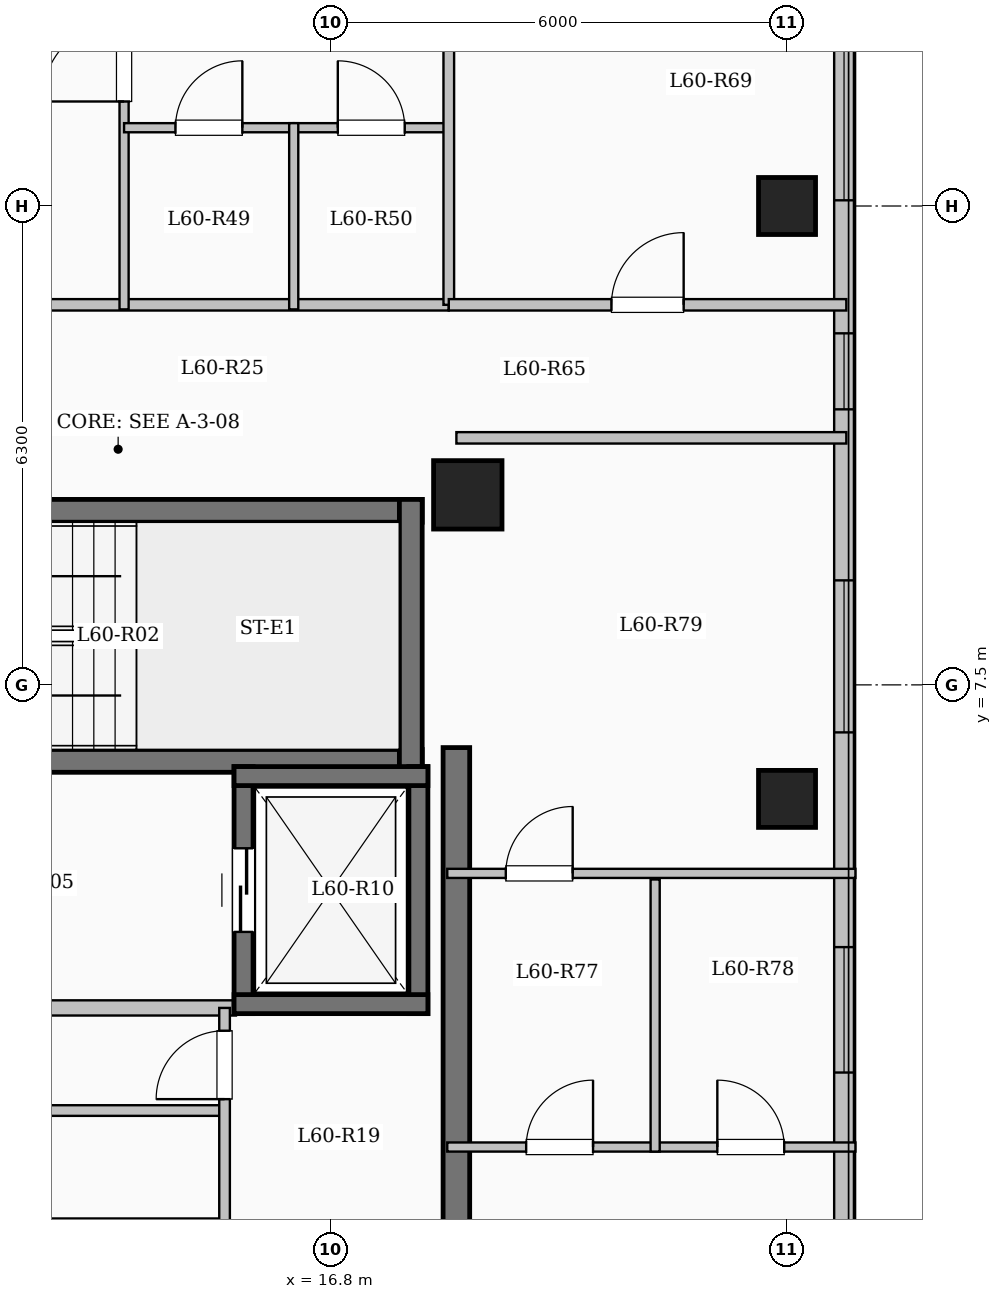
"""IFC4 building model, lengths in metres.
Left out: names, types, materials, properties, quantities, classifications, styles, units other than length and angle.
Written with IfcOpenShell. Run it as: python <this file> out.ifc"""

import sys

from ifc_helpers import new_model, si_unit, direction, frame, frame_2d, origin, origin_2d, place, context, subcontext, project, spatial, rectangle, extrude, element, fill, save


model = new_model("IFC4")
c1 = context("Model", 3, precision=1e-05, world=origin(), true_north=direction((0.0, 1.0)))
c2 = subcontext(c1, "Body", "Model", "MODEL_VIEW")
j1 = project(units=[si_unit("LENGTHUNIT", "METRE"), si_unit("PLANEANGLEUNIT", "RADIAN")], contexts=[c1])
p1 = place(None, origin())
s1 = spatial("IfcSite", under=j1, at=p1, CompositionType="ELEMENT")
p2 = place(p1, origin())
s2 = spatial("IfcBuilding", under=s1, at=p2, CompositionType="ELEMENT")
p3 = place(p2, frame((0.0, 0.0, 220.4)))
s3 = spatial("IfcBuildingStorey", under=s2, at=p3, CompositionType="ELEMENT", Elevation=220.4)
p4 = place(p3, frame((18.6, 10.0, 0.0), z_axis=(0.0, 0.0, 1.0), x_axis=(1.0, 0.0, 0.0)))
e1 = element("IfcColumn", 1, at=p4, inside=s3, PredefinedType="COLUMN", context=c2, shape_type="SweptSolid", body=[
    extrude(rectangle(XDim=0.9, YDim=0.9, at=origin_2d()), origin(), (0.0, 0.0, 1.0), 3.35),
])
for number, where, z_axis, x_axis in (
    (2, (22.8, 6.0, 0.0), (0.0, 0.0, 1.0), (1.0, 0.0, 0.0)),
    (3, (22.8, 13.8, 0.0), (0.0, 0.0, 1.0), (1.0, 0.0, 0.0)),
):
    element("IfcColumn", number, at=place(p3, frame(where, z_axis=z_axis, x_axis=x_axis)), inside=s3, PredefinedType="COLUMN", context=c2, shape_type="SweptSolid", body=[
        extrude(rectangle(XDim=0.75, YDim=0.75, at=origin_2d()), origin(), (0.0, 0.0, 1.0), 3.35),
    ])
p5 = place(p3, frame((23.55, 17.25, 0.0), z_axis=(0.0, 0.0, 1.0), x_axis=(0.0, -1.0, 0.0)))
e4 = element("IfcWall", 4, at=p5, inside=s3, PredefinedType="SOLIDWALL", context=c2, shape_type="SweptSolid", body=[
    extrude(rectangle(XDim=34.5, YDim=0.26, at=frame_2d((17.25, 0.0))), origin(), (0.0, 0.0, 1.0), 3.1),
])
p6 = place(p5, frame((1.375, 0.0, 0.9)))
e5 = element("IfcOpeningElement", 5, at=p6, cuts=e4, PredefinedType="OPENING", context=c2, shape_type="SweptSolid", body=[
    extrude(rectangle(XDim=2.0, YDim=1.7, at=frame_2d((1.0, 0.85))), frame((0.0, 0.14, 0.0), z_axis=(0.0, -1.0, 0.0), x_axis=(1.0, 0.0, 0.0)), (0.0, 0.0, 1.0), 0.28),
])
p7 = place(p5, frame((5.125, 0.0, 0.95)))
e6 = element("IfcOpeningElement", 6, at=p7, cuts=e4, PredefinedType="OPENING", context=c2, shape_type="SweptSolid", body=[
    extrude(rectangle(XDim=1.0, YDim=1.5, at=frame_2d((0.5, 0.75))), frame((0.0, 0.14, 0.0), z_axis=(0.0, -1.0, 0.0), x_axis=(1.0, 0.0, 0.0)), (0.0, 0.0, 1.0), 0.28),
])
p8 = place(p5, frame((8.375, 0.0, 0.9)))
e7 = element("IfcOpeningElement", 7, at=p8, cuts=e4, PredefinedType="OPENING", context=c2, shape_type="SweptSolid", body=[
    extrude(rectangle(XDim=2.0, YDim=1.7, at=frame_2d((1.0, 0.85))), frame((0.0, 0.14, 0.0), z_axis=(0.0, -1.0, 0.0), x_axis=(1.0, 0.0, 0.0)), (0.0, 0.0, 1.0), 0.28),
])
p9 = place(p5, frame((13.2, 0.0, 0.9)))
e8 = element("IfcOpeningElement", 8, at=p9, cuts=e4, PredefinedType="OPENING", context=c2, shape_type="SweptSolid", body=[
    extrude(rectangle(XDim=1.65, YDim=1.6, at=frame_2d((0.825, 0.8))), frame((0.0, 0.14, 0.0), z_axis=(0.0, -1.0, 0.0), x_axis=(1.0, 0.0, 0.0)), (0.0, 0.0, 1.0), 0.28),
])
p10 = place(p5, frame((19.05, 0.0, 0.9)))
e9 = element("IfcOpeningElement", 9, at=p10, cuts=e4, PredefinedType="OPENING", context=c2, shape_type="SweptSolid", body=[
    extrude(rectangle(XDim=2.2, YDim=1.75, at=frame_2d((1.1, 0.875))), frame((0.0, 0.14, 0.0), z_axis=(0.0, -1.0, 0.0), x_axis=(1.0, 0.0, 0.0)), (0.0, 0.0, 1.0), 0.28),
])
p11 = place(p5, frame((24.975, 0.0, 0.95)))
e10 = element("IfcOpeningElement", 10, at=p11, cuts=e4, PredefinedType="OPENING", context=c2, shape_type="SweptSolid", body=[
    extrude(rectangle(XDim=1.2, YDim=1.5, at=frame_2d((0.6, 0.75))), frame((0.0, 0.14, 0.0), z_axis=(0.0, -1.0, 0.0), x_axis=(1.0, 0.0, 0.0)), (0.0, 0.0, 1.0), 0.28),
])
p12 = place(p5, frame((29.475, 0.0, 0.9)))
e11 = element("IfcOpeningElement", 11, at=p12, cuts=e4, PredefinedType="OPENING", context=c2, shape_type="SweptSolid", body=[
    extrude(rectangle(XDim=2.2, YDim=1.75, at=frame_2d((1.1, 0.875))), frame((0.0, 0.14, 0.0), z_axis=(0.0, -1.0, 0.0), x_axis=(1.0, 0.0, 0.0)), (0.0, 0.0, 1.0), 0.28),
])
p13 = place(p3, frame((10.0, 9.79, 0.0), z_axis=(0.0, 0.0, 1.0), x_axis=(1.0, 0.0, 0.0)))
e12 = element("IfcWall", 12, at=p13, inside=s3, PredefinedType="SHEAR", context=c2, shape_type="SweptSolid", body=[
    extrude(rectangle(XDim=8.0, YDim=0.3, at=frame_2d((4.0, 0.0))), origin(), (0.0, 0.0, 1.0), 3.35),
])
p14 = place(p3, frame((10.0, 6.5, 0.0), z_axis=(0.0, 0.0, 1.0), x_axis=(1.0, 0.0, 0.0)))
e13 = element("IfcWall", 13, at=p14, inside=s3, PredefinedType="SHEAR", context=c2, shape_type="SweptSolid", body=[
    extrude(rectangle(XDim=8.0, YDim=0.3, at=frame_2d((4.0, 0.0))), origin(), (0.0, 0.0, 1.0), 3.35),
])
p15 = place(p14, frame((0.55, 0.0, 0.0)))
e14 = element("IfcOpeningElement", 14, at=p15, cuts=e13, PredefinedType="OPENING", context=c2, shape_type="SweptSolid", body=[
    extrude(rectangle(XDim=1.0, YDim=2.15, at=frame_2d((0.5, 1.075))), frame((0.0, 0.16, 0.0), z_axis=(0.0, -1.0, 0.0), x_axis=(1.0, 0.0, 0.0)), (0.0, 0.0, 1.0), 0.32),
])
p16 = place(p3, frame((17.85, 6.35, 0.0), z_axis=(0.0, 0.0, 1.0), x_axis=(0.0, 1.0, 0.0)))
e15 = element("IfcWall", 15, at=p16, inside=s3, PredefinedType="SHEAR", context=c2, shape_type="SweptSolid", body=[
    extrude(rectangle(XDim=3.59, YDim=0.3, at=frame_2d((1.795, 0.0))), origin(), (0.0, 0.0, 1.0), 3.35),
])
p17 = place(p3, frame((10.15, 3.25, 0.0), z_axis=(0.0, 0.0, 1.0), x_axis=(1.0, 0.0, 0.0)))
e16 = element("IfcWall", 16, at=p17, inside=s3, PredefinedType="SOLIDWALL", context=c2, shape_type="SweptSolid", body=[
    extrude(rectangle(XDim=5.4, YDim=0.2, at=frame_2d((2.7, 0.0))), origin(), (0.0, 0.0, 1.0), 3.1),
])
p18 = place(p3, frame((15.65, 3.175, 0.0), z_axis=(0.0, 0.0, 1.0), x_axis=(0.0, 1.0, 0.0)))
e17 = element("IfcWall", 17, at=p18, inside=s3, PredefinedType="SHEAR", context=c2, shape_type="SweptSolid", body=[
    extrude(rectangle(XDim=3.25, YDim=0.25, at=frame_2d((1.625, 0.0))), origin(), (0.0, 0.0, 1.0), 3.35),
])
p19 = place(p18, frame((1.075, 0.0, 0.0)))
e18 = element("IfcOpeningElement", 18, at=p19, cuts=e17, PredefinedType="OPENING", context=c2, shape_type="SweptSolid", body=[
    extrude(rectangle(XDim=1.1, YDim=2.15, at=frame_2d((0.55, 1.075))), frame((0.0, 0.135, 0.0), z_axis=(0.0, -1.0, 0.0), x_axis=(1.0, 0.0, 0.0)), (0.0, 0.0, 1.0), 0.27),
])
p20 = place(p3, frame((17.95, 3.175, 0.0), z_axis=(0.0, 0.0, 1.0), x_axis=(0.0, 1.0, 0.0)))
e19 = element("IfcWall", 19, at=p20, inside=s3, PredefinedType="SHEAR", context=c2, shape_type="SweptSolid", body=[
    extrude(rectangle(XDim=3.25, YDim=0.25, at=frame_2d((1.625, 0.0))), origin(), (0.0, 0.0, 1.0), 3.35),
])
for number, where, z_axis, x_axis in (
    (20, (15.525, 3.3, 0.0), (0.0, 0.0, 1.0), (1.0, 0.0, 0.0)),
    (21, (15.525, 6.3, 0.0), (0.0, 0.0, 1.0), (1.0, 0.0, 0.0)),
):
    element("IfcWall", number, at=place(p3, frame(where, z_axis=z_axis, x_axis=x_axis)), inside=s3, PredefinedType="SHEAR", context=c2, shape_type="SweptSolid", body=[
        extrude(rectangle(XDim=2.55, YDim=0.25, at=frame_2d((1.275, 0.0))), origin(), (0.0, 0.0, 1.0), 3.35),
    ])
p21 = place(p3, frame((18.45, -7.375, 0.0), z_axis=(0.0, 0.0, 1.0), x_axis=(0.0, 1.0, 0.0)))
e22 = element("IfcWall", 22, at=p21, inside=s3, PredefinedType="SHEAR", context=c2, shape_type="SweptSolid", body=[
    extrude(rectangle(XDim=14.05, YDim=0.35, at=frame_2d((7.025, 0.0))), origin(), (0.0, 0.0, 1.0), 3.35),
])
p22 = place(p3, frame((12.8, 1.9, 0.0), z_axis=(0.0, 0.0, 1.0), x_axis=(1.0, 0.0, 0.0)))
e23 = element("IfcWall", 23, at=p22, inside=s3, PredefinedType="PARTITIONING", context=c2, shape_type="SweptSolid", body=[
    extrude(rectangle(XDim=2.6, YDim=0.14, at=frame_2d((1.3, 0.0))), origin(), (0.0, 0.0, 1.0), 3.1),
])
p23 = place(p3, frame((15.4, -7.2, 0.0), z_axis=(0.0, 0.0, 1.0), x_axis=(0.0, 1.0, 0.0)))
e24 = element("IfcWall", 24, at=p23, inside=s3, PredefinedType="PARTITIONING", context=c2, shape_type="SweptSolid", body=[
    extrude(rectangle(XDim=10.45, YDim=0.14, at=frame_2d((5.225, 0.0))), origin(), (0.0, 0.0, 1.0), 3.1),
])
p24 = place(p23, frame((9.25, 0.0, 0.0)))
e25 = element("IfcOpeningElement", 25, at=p24, cuts=e24, PredefinedType="OPENING", context=c2, shape_type="SweptSolid", body=[
    extrude(rectangle(XDim=0.9, YDim=2.08, at=frame_2d((0.45, 1.04))), frame((0.0, 0.08, 0.0), z_axis=(0.0, -1.0, 0.0), x_axis=(1.0, 0.0, 0.0)), (0.0, 0.0, 1.0), 0.16),
])
p25 = place(p3, frame((3.85, 12.5, 0.0), z_axis=(0.0, 0.0, 1.0), x_axis=(1.0, 0.0, 0.0)))
e26 = element("IfcWall", 26, at=p25, inside=s3, PredefinedType="PARTITIONING", context=c2, shape_type="SweptSolid", body=[
    extrude(rectangle(XDim=14.5, YDim=0.15, at=frame_2d((7.25, 0.0))), origin(), (0.0, 0.0, 1.0), 3.1),
])
p26 = place(p25, frame((0.7, 0.0, 0.0)))
e27 = element("IfcOpeningElement", 27, at=p26, cuts=e26, PredefinedType="OPENING", context=c2, shape_type="SweptSolid", body=[
    extrude(rectangle(XDim=0.96, YDim=2.15, at=frame_2d((0.48, 1.075))), frame((0.0, 0.085, 0.0), z_axis=(0.0, -1.0, 0.0), x_axis=(1.0, 0.0, 0.0)), (0.0, 0.0, 1.0), 0.17),
])
p27 = place(p25, frame((6.656, 0.0, 0.0)))
e28 = element("IfcOpeningElement", 28, at=p27, cuts=e26, PredefinedType="OPENING", context=c2, shape_type="SweptSolid", body=[
    extrude(rectangle(XDim=0.96, YDim=2.15, at=frame_2d((0.48, 1.075))), frame((0.0, 0.085, 0.0), z_axis=(0.0, -1.0, 0.0), x_axis=(1.0, 0.0, 0.0)), (0.0, 0.0, 1.0), 0.17),
])
p28 = place(p3, frame((14.078, 12.44, 0.0), z_axis=(0.0, 0.0, 1.0), x_axis=(0.0, 1.0, 0.0)))
e29 = element("IfcWall", 29, at=p28, inside=s3, PredefinedType="PARTITIONING", context=c2, shape_type="SweptSolid", body=[
    extrude(rectangle(XDim=8.46, YDim=0.12, at=frame_2d((4.23, 0.0))), origin(), (0.0, 0.0, 1.0), 3.1),
])
p29 = place(p28, frame((2.735, 0.0, 0.0)))
e30 = element("IfcOpeningElement", 30, at=p29, cuts=e29, PredefinedType="OPENING", context=c2, shape_type="SweptSolid", body=[
    extrude(rectangle(XDim=1.08, YDim=2.15, at=frame_2d((0.54, 1.075))), frame((0.0, 0.07, 0.0), z_axis=(0.0, -1.0, 0.0), x_axis=(1.0, 0.0, 0.0)), (0.0, 0.0, 1.0), 0.14),
])
p30 = place(p3, frame((14.078, 14.83, 0.0), z_axis=(0.0, 0.0, 1.0), x_axis=(1.0, 0.0, 0.0)))
e31 = element("IfcWall", 31, at=p30, inside=s3, PredefinedType="PARTITIONING", context=c2, shape_type="SweptSolid", body=[
    extrude(rectangle(XDim=2.232, YDim=0.12, at=frame_2d((1.116, 0.0))), origin(), (0.0, 0.0, 1.0), 3.1),
])
p31 = place(p30, frame((0.676, 0.0, 0.0)))
e32 = element("IfcOpeningElement", 32, at=p31, cuts=e31, PredefinedType="OPENING", context=c2, shape_type="SweptSolid", body=[
    extrude(rectangle(XDim=0.88, YDim=2.1, at=frame_2d((0.44, 1.05))), frame((0.0, 0.07, 0.0), z_axis=(0.0, -1.0, 0.0), x_axis=(1.0, 0.0, 0.0)), (0.0, 0.0, 1.0), 0.14),
])
p32 = place(p3, frame((16.31, 14.83, 0.0), z_axis=(0.0, 0.0, 1.0), x_axis=(1.0, 0.0, 0.0)))
e33 = element("IfcWall", 33, at=p32, inside=s3, PredefinedType="PARTITIONING", context=c2, shape_type="SweptSolid", body=[
    extrude(rectangle(XDim=2.04, YDim=0.12, at=frame_2d((1.02, 0.0))), origin(), (0.0, 0.0, 1.0), 3.1),
])
p33 = place(p32, frame((0.58, 0.0, 0.0)))
e34 = element("IfcOpeningElement", 34, at=p33, cuts=e33, PredefinedType="OPENING", context=c2, shape_type="SweptSolid", body=[
    extrude(rectangle(XDim=0.88, YDim=2.1, at=frame_2d((0.44, 1.05))), frame((0.0, 0.07, 0.0), z_axis=(0.0, -1.0, 0.0), x_axis=(1.0, 0.0, 0.0)), (0.0, 0.0, 1.0), 0.14),
])
p34 = place(p3, frame((16.31, 12.44, 0.0), z_axis=(0.0, 0.0, 1.0), x_axis=(0.0, 1.0, 0.0)))
e35 = element("IfcWall", 35, at=p34, inside=s3, PredefinedType="PARTITIONING", context=c2, shape_type="SweptSolid", body=[
    extrude(rectangle(XDim=2.45, YDim=0.12, at=frame_2d((1.225, 0.0))), origin(), (0.0, 0.0, 1.0), 3.1),
])
p35 = place(p3, frame((18.45, 10.75, 0.0), z_axis=(0.0, 0.0, 1.0), x_axis=(1.0, 0.0, 0.0)))
e36 = element("IfcWall", 36, at=p35, inside=s3, PredefinedType="PARTITIONING", context=c2, shape_type="SweptSolid", body=[
    extrude(rectangle(XDim=5.13, YDim=0.15, at=frame_2d((2.565, 0.0))), origin(), (0.0, 0.0, 1.0), 3.1),
])
p36 = place(p3, frame((18.35, 12.5, 0.0), z_axis=(0.0, 0.0, 1.0), x_axis=(0.0, 1.0, 0.0)))
e37 = element("IfcWall", 37, at=p36, inside=s3, PredefinedType="PARTITIONING", context=c2, shape_type="SweptSolid", body=[
    extrude(rectangle(XDim=4.75, YDim=0.14, at=frame_2d((2.375, 0.0))), origin(), (0.0, 0.0, 1.0), 3.1),
])
p37 = place(p3, frame((18.35, 12.5, 0.0), z_axis=(0.0, 0.0, 1.0), x_axis=(1.0, 0.0, 0.0)))
e38 = element("IfcWall", 38, at=p37, inside=s3, PredefinedType="PARTITIONING", context=c2, shape_type="SweptSolid", body=[
    extrude(rectangle(XDim=5.23, YDim=0.15, at=frame_2d((2.615, 0.0))), origin(), (0.0, 0.0, 1.0), 3.1),
])
p38 = place(p37, frame((2.14, 0.0, 0.0)))
e39 = element("IfcOpeningElement", 39, at=p38, cuts=e38, PredefinedType="OPENING", context=c2, shape_type="SweptSolid", body=[
    extrude(rectangle(XDim=0.95, YDim=2.15, at=frame_2d((0.475, 1.075))), frame((0.0, 0.085, 0.0), z_axis=(0.0, -1.0, 0.0), x_axis=(1.0, 0.0, 0.0)), (0.0, 0.0, 1.0), 0.17),
])
p39 = place(p3, frame((18.33, 1.42, 0.0), z_axis=(0.0, 0.0, 1.0), x_axis=(1.0, 0.0, 0.0)))
e40 = element("IfcWall", 40, at=p39, inside=s3, PredefinedType="PARTITIONING", context=c2, shape_type="SweptSolid", body=[
    extrude(rectangle(XDim=5.37, YDim=0.12, at=frame_2d((2.685, 0.0))), origin(), (0.0, 0.0, 1.0), 3.1),
])
p40 = place(p39, frame((1.038, 0.0, 0.0)))
e41 = element("IfcOpeningElement", 41, at=p40, cuts=e40, PredefinedType="OPENING", context=c2, shape_type="SweptSolid", body=[
    extrude(rectangle(XDim=0.88, YDim=2.1, at=frame_2d((0.44, 1.05))), frame((0.0, 0.07, 0.0), z_axis=(0.0, -1.0, 0.0), x_axis=(1.0, 0.0, 0.0)), (0.0, 0.0, 1.0), 0.14),
])
p41 = place(p39, frame((3.553, 0.0, 0.0)))
e42 = element("IfcOpeningElement", 42, at=p41, cuts=e40, PredefinedType="OPENING", context=c2, shape_type="SweptSolid", body=[
    extrude(rectangle(XDim=0.88, YDim=2.1, at=frame_2d((0.44, 1.05))), frame((0.0, 0.07, 0.0), z_axis=(0.0, -1.0, 0.0), x_axis=(1.0, 0.0, 0.0)), (0.0, 0.0, 1.0), 0.14),
])
p42 = place(p3, frame((18.33, 5.02, 0.0), z_axis=(0.0, 0.0, 1.0), x_axis=(1.0, 0.0, 0.0)))
e43 = element("IfcWall", 43, at=p42, inside=s3, PredefinedType="PARTITIONING", context=c2, shape_type="SweptSolid", body=[
    extrude(rectangle(XDim=5.37, YDim=0.12, at=frame_2d((2.685, 0.0))), origin(), (0.0, 0.0, 1.0), 3.1),
])
p43 = place(p42, frame((0.77, 0.0, 0.0)))
e44 = element("IfcOpeningElement", 44, at=p43, cuts=e43, PredefinedType="OPENING", context=c2, shape_type="SweptSolid", body=[
    extrude(rectangle(XDim=0.88, YDim=2.1, at=frame_2d((0.44, 1.05))), frame((0.0, 0.07, 0.0), z_axis=(0.0, -1.0, 0.0), x_axis=(1.0, 0.0, 0.0)), (0.0, 0.0, 1.0), 0.14),
])
p44 = place(p3, frame((21.065, 1.36, 0.0), z_axis=(0.0, 0.0, 1.0), x_axis=(0.0, 1.0, 0.0)))
e45 = element("IfcWall", 45, at=p44, inside=s3, PredefinedType="PARTITIONING", context=c2, shape_type="SweptSolid", body=[
    extrude(rectangle(XDim=3.58, YDim=0.12, at=frame_2d((1.79, 0.0))), origin(), (0.0, 0.0, 1.0), 3.1),
])
p45 = place(p6, origin())
e46 = element("IfcWindow", 46, at=p45, inside=s3, PartitioningType="SINGLE_PANEL", PredefinedType="WINDOW", context=c2, shape_type="SweptSolid", body=[
    extrude(rectangle(XDim=2.0, YDim=1.7, at=frame_2d((1.0, 0.85))), frame((0.0, 0.03, 0.0), z_axis=(0.0, -1.0, 0.0), x_axis=(1.0, 0.0, 0.0)), (0.0, 0.0, 1.0), 0.06),
])
fill(e5, e46)
p46 = place(p7, origin())
e47 = element("IfcWindow", 47, at=p46, inside=s3, PartitioningType="SINGLE_PANEL", PredefinedType="WINDOW", context=c2, shape_type="SweptSolid", body=[
    extrude(rectangle(XDim=1.0, YDim=1.5, at=frame_2d((0.5, 0.75))), frame((0.0, 0.03, 0.0), z_axis=(0.0, -1.0, 0.0), x_axis=(1.0, 0.0, 0.0)), (0.0, 0.0, 1.0), 0.06),
])
fill(e6, e47)
p47 = place(p8, origin())
e48 = element("IfcWindow", 48, at=p47, inside=s3, PartitioningType="SINGLE_PANEL", PredefinedType="WINDOW", context=c2, shape_type="SweptSolid", body=[
    extrude(rectangle(XDim=2.0, YDim=1.7, at=frame_2d((1.0, 0.85))), frame((0.0, 0.03, 0.0), z_axis=(0.0, -1.0, 0.0), x_axis=(1.0, 0.0, 0.0)), (0.0, 0.0, 1.0), 0.06),
])
fill(e7, e48)
p48 = place(p9, origin())
e49 = element("IfcWindow", 49, at=p48, inside=s3, PartitioningType="SINGLE_PANEL", PredefinedType="WINDOW", context=c2, shape_type="SweptSolid", body=[
    extrude(rectangle(XDim=1.65, YDim=1.6, at=frame_2d((0.825, 0.8))), frame((0.0, 0.03, 0.0), z_axis=(0.0, -1.0, 0.0), x_axis=(1.0, 0.0, 0.0)), (0.0, 0.0, 1.0), 0.06),
])
fill(e8, e49)
p49 = place(p19, origin())
e50 = element("IfcDoor", 50, at=p49, inside=s3, OperationType="SLIDING_TO_LEFT", PredefinedType="DOOR", context=c2, shape_type="SweptSolid", body=[
    extrude(rectangle(XDim=1.1, YDim=2.15, at=frame_2d((0.55, 1.075))), frame((0.0, 0.025, 0.0), z_axis=(0.0, -1.0, 0.0), x_axis=(1.0, 0.0, 0.0)), (0.0, 0.0, 1.0), 0.05),
])
fill(e18, e50)
p50 = place(p24, origin())
e51 = element("IfcDoor", 51, at=p50, inside=s3, OperationType="SINGLE_SWING_LEFT", PredefinedType="DOOR", context=c2, shape_type="SweptSolid", body=[
    extrude(rectangle(XDim=0.9, YDim=2.08, at=frame_2d((0.45, 1.04))), frame((0.0, 0.025, 0.0), z_axis=(0.0, -1.0, 0.0), x_axis=(1.0, 0.0, 0.0)), (0.0, 0.0, 1.0), 0.05),
])
fill(e25, e51)
p51 = place(p29, origin())
e52 = element("IfcDoor", 52, at=p51, inside=s3, OperationType="SINGLE_SWING_LEFT", PredefinedType="DOOR", context=c2, shape_type="SweptSolid", body=[
    extrude(rectangle(XDim=1.08, YDim=2.15, at=frame_2d((0.54, 1.075))), frame((0.0, 0.025, 0.0), z_axis=(0.0, -1.0, 0.0), x_axis=(1.0, 0.0, 0.0)), (0.0, 0.0, 1.0), 0.05),
])
fill(e30, e52)
p52 = place(p31, origin())
e53 = element("IfcDoor", 53, at=p52, inside=s3, OperationType="SINGLE_SWING_RIGHT", PredefinedType="DOOR", context=c2, shape_type="SweptSolid", body=[
    extrude(rectangle(XDim=0.88, YDim=2.1, at=frame_2d((0.44, 1.05))), frame((0.0, 0.025, 0.0), z_axis=(0.0, -1.0, 0.0), x_axis=(1.0, 0.0, 0.0)), (0.0, 0.0, 1.0), 0.05),
])
fill(e32, e53)
p53 = place(p33, origin())
e54 = element("IfcDoor", 54, at=p53, inside=s3, OperationType="SINGLE_SWING_LEFT", PredefinedType="DOOR", context=c2, shape_type="SweptSolid", body=[
    extrude(rectangle(XDim=0.88, YDim=2.1, at=frame_2d((0.44, 1.05))), frame((0.0, 0.025, 0.0), z_axis=(0.0, -1.0, 0.0), x_axis=(1.0, 0.0, 0.0)), (0.0, 0.0, 1.0), 0.05),
])
fill(e34, e54)
p54 = place(p38, origin())
e55 = element("IfcDoor", 55, at=p54, inside=s3, OperationType="SINGLE_SWING_RIGHT", PredefinedType="DOOR", context=c2, shape_type="SweptSolid", body=[
    extrude(rectangle(XDim=0.95, YDim=2.15, at=frame_2d((0.475, 1.075))), frame((0.0, 0.025, 0.0), z_axis=(0.0, -1.0, 0.0), x_axis=(1.0, 0.0, 0.0)), (0.0, 0.0, 1.0), 0.05),
])
fill(e39, e55)
p55 = place(p40, origin())
e56 = element("IfcDoor", 56, at=p55, inside=s3, OperationType="SINGLE_SWING_RIGHT", PredefinedType="DOOR", context=c2, shape_type="SweptSolid", body=[
    extrude(rectangle(XDim=0.88, YDim=2.1, at=frame_2d((0.44, 1.05))), frame((0.0, 0.025, 0.0), z_axis=(0.0, -1.0, 0.0), x_axis=(1.0, 0.0, 0.0)), (0.0, 0.0, 1.0), 0.05),
])
fill(e41, e56)
p56 = place(p41, origin())
e57 = element("IfcDoor", 57, at=p56, inside=s3, OperationType="SINGLE_SWING_LEFT", PredefinedType="DOOR", context=c2, shape_type="SweptSolid", body=[
    extrude(rectangle(XDim=0.88, YDim=2.1, at=frame_2d((0.44, 1.05))), frame((0.0, 0.025, 0.0), z_axis=(0.0, -1.0, 0.0), x_axis=(1.0, 0.0, 0.0)), (0.0, 0.0, 1.0), 0.05),
])
fill(e42, e57)
p57 = place(p43, origin())
e58 = element("IfcDoor", 58, at=p57, inside=s3, OperationType="SINGLE_SWING_RIGHT", PredefinedType="DOOR", context=c2, shape_type="SweptSolid", body=[
    extrude(rectangle(XDim=0.88, YDim=2.1, at=frame_2d((0.44, 1.05))), frame((0.0, 0.025, 0.0), z_axis=(0.0, -1.0, 0.0), x_axis=(1.0, 0.0, 0.0)), (0.0, 0.0, 1.0), 0.05),
])
fill(e44, e58)
save(model, sys.argv[1])
